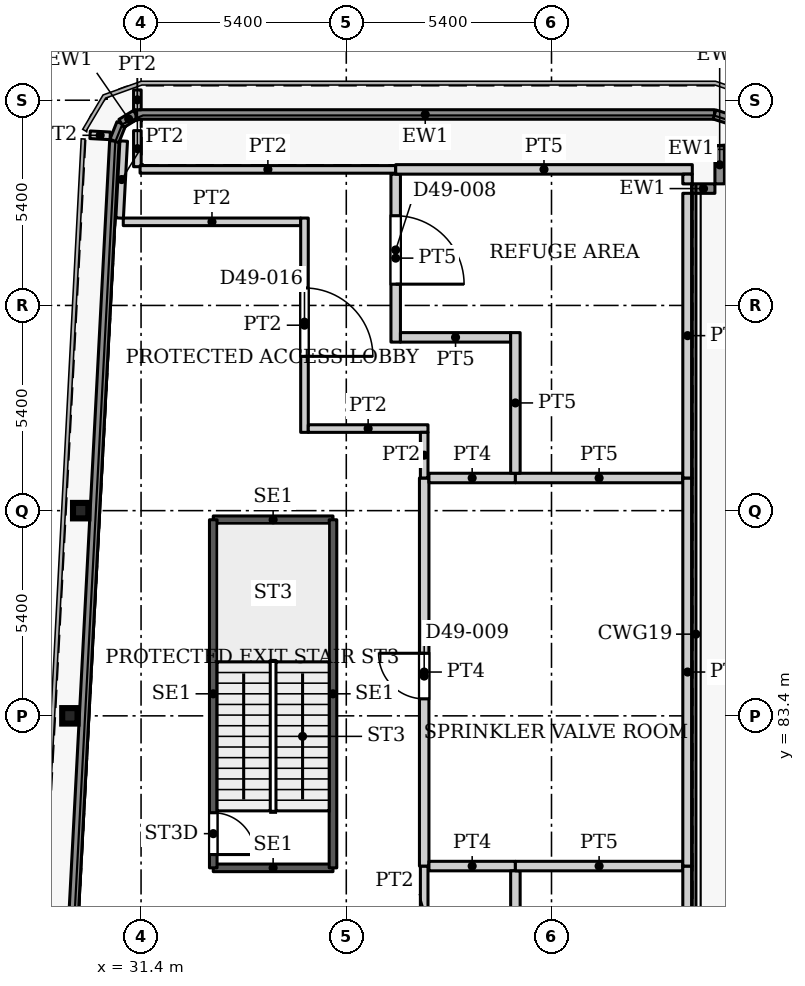
"""IFC4 building model, lengths in metres.
Left out: names, types, materials, properties, quantities, classifications, styles, units other than length and angle.
Written with IfcOpenShell. Run it as: python <this file> out.ifc"""

import sys

from ifc_helpers import new_model, si_unit, direction, frame, frame_2d, origin, origin_2d, place, context, subcontext, project, spatial, rectangle, i_section, extrude, source, transform, mapped, element, fill, save


model = new_model("IFC4")
c1 = context("Model", 3, precision=1e-05, world=origin(), true_north=direction((0.0, 1.0)))
c2 = subcontext(c1, "Body", "Model", "MODEL_VIEW")
j1 = project(units=[si_unit("LENGTHUNIT", "METRE"), si_unit("PLANEANGLEUNIT", "RADIAN")], contexts=[c1])
p1 = place(None, origin())
s1 = spatial("IfcSite", under=j1, at=p1, CompositionType="ELEMENT")
p2 = place(p1, origin())
s2 = spatial("IfcBuilding", under=s1, at=p2, CompositionType="ELEMENT")
p3 = place(p2, frame((0.0, 0.0, 211.1)))
s3 = spatial("IfcBuildingStorey", under=s2, at=p3, CompositionType="ELEMENT", Elevation=211.1)
for number, where, z_axis, x_axis in (
    (1, (29.527, 83.4, 0.0), (0.0, 0.0, 1.0), (1.0, 0.0, 0.0)),
    (2, (29.811, 88.8, 0.0), (0.0, 0.0, 1.0), (1.0, 0.0, 0.0)),
):
    element("IfcColumn", number, at=place(p3, frame(where, z_axis=z_axis, x_axis=x_axis)), inside=s3, PredefinedType="COLUMN", context=c2, shape_type="SweptSolid", body=[
        extrude(i_section(OverallWidth=0.404, OverallDepth=0.407, WebThickness=0.027, FlangeThickness=0.044, FilletRadius=0.012, at=origin_2d()), origin(), (0.0, 0.0, 1.0), 5.1),
    ])
p4 = place(p3, frame((27.195, 31.969, 0.0), z_axis=(0.0, 0.0, 1.0), x_axis=(0.052556141556, 0.99861797099, 0.0)))
e3 = element("IfcWall", 3, at=p4, inside=s3, PredefinedType="SOLIDWALL", context=c2, shape_type="SweptSolid", body=[
    extrude(rectangle(XDim=66.651, YDim=0.25, at=frame_2d((33.326, 0.0))), origin(), (0.0, 0.0, 1.0), 4.95),
])
p5 = place(p3, frame((30.698, 98.528, 0.0), z_axis=(0.0, 0.0, 1.0), x_axis=(0.370881773365, 0.928680090336, 0.0)))
e4 = element("IfcWall", 4, at=p5, inside=s3, PredefinedType="SOLIDWALL", context=c2, shape_type="SweptSolid", body=[
    extrude(rectangle(XDim=0.496, YDim=0.25, at=frame_2d((0.248, 0.0))), origin(), (0.0, 0.0, 1.0), 4.95),
])
p6 = place(p3, frame((30.882, 98.989, 0.0), z_axis=(0.0, 0.0, 1.0), x_axis=(0.851899959866, 0.523704552568, 0.0)))
e5 = element("IfcWall", 5, at=p6, inside=s3, PredefinedType="SOLIDWALL", context=c2, shape_type="SweptSolid", body=[
    extrude(rectangle(XDim=0.451, YDim=0.25, at=frame_2d((0.225, 0.0))), origin(), (0.0, 0.0, 1.0), 4.95),
])
p7 = place(p3, frame((31.266, 99.225, 0.0), z_axis=(0.0, 0.0, 1.0), x_axis=(1.0, 0.0, 0.0)))
e6 = element("IfcWall", 6, at=p7, inside=s3, PredefinedType="SOLIDWALL", context=c2, shape_type="SweptSolid", body=[
    extrude(rectangle(XDim=15.223, YDim=0.25, at=frame_2d((7.611, 0.0))), origin(), (0.0, 0.0, 1.0), 4.95),
])
p8 = place(p3, frame((46.489, 99.225, 0.0), z_axis=(0.0, 0.0, 1.0), x_axis=(0.952979365451, -0.303035194367, 0.0)))
e7 = element("IfcWall", 7, at=p8, inside=s3, PredefinedType="SOLIDWALL", context=c2, shape_type="SweptSolid", body=[
    extrude(rectangle(XDim=0.479, YDim=0.25, at=frame_2d((0.239, 0.0))), origin(), (0.0, 0.0, 1.0), 4.95),
])
p9 = place(p3, frame((47.441, 98.337, 0.0), z_axis=(0.0, 0.0, 1.0), x_axis=(-0.997866442629, -0.065288304281, 0.0)))
e8 = element("IfcWall", 8, at=p9, inside=s3, PredefinedType="SOLIDWALL", context=c2, shape_type="SweptSolid", body=[
    extrude(rectangle(XDim=0.935, YDim=0.25, at=frame_2d((0.467, 0.0))), origin(), (0.0, 0.0, 1.0), 4.95),
])
p10 = place(p3, frame((46.625, 98.401, 0.0), z_axis=(0.0, 0.0, 1.0), x_axis=(0.0, -1.0, 0.0)))
e9 = element("IfcWall", 9, at=p10, inside=s3, PredefinedType="SOLIDWALL", context=c2, shape_type="SweptSolid", body=[
    extrude(rectangle(XDim=1.001, YDim=0.25, at=frame_2d((0.5, 0.0))), origin(), (0.0, 0.0, 1.0), 4.95),
])
p11 = place(p3, frame((46.5, 97.275, 0.0), z_axis=(0.0, 0.0, 1.0), x_axis=(-1.0, 0.0, 0.0)))
e10 = element("IfcWall", 10, at=p11, inside=s3, PredefinedType="SOLIDWALL", context=c2, shape_type="SweptSolid", body=[
    extrude(rectangle(XDim=0.6, YDim=0.25, at=frame_2d((0.3, 0.0))), origin(), (0.0, 0.0, 1.0), 4.95),
])
for number, where, z_axis, x_axis in (
    (11, (33.3, 79.4, 0.0), (0.0, 0.0, 1.0), (1.0, 0.0, 0.0)),
    (12, (33.3, 88.56, 0.0), (0.0, 0.0, 1.0), (1.0, 0.0, 0.0)),
):
    element("IfcWall", number, at=place(p3, frame(where, z_axis=z_axis, x_axis=x_axis)), inside=s3, PredefinedType="SHEAR", context=c2, shape_type="SweptSolid", body=[
        extrude(rectangle(XDim=3.15, YDim=0.2, at=frame_2d((1.575, 0.0))), origin(), (0.0, 0.0, 1.0), 5.1),
    ])
p12 = place(p3, frame((33.3, 79.4, 0.0), z_axis=(0.0, 0.0, 1.0), x_axis=(0.0, 1.0, 0.0)))
e13 = element("IfcWall", 13, at=p12, inside=s3, PredefinedType="SHEAR", context=c2, shape_type="SweptSolid", body=[
    extrude(rectangle(XDim=9.16, YDim=0.2, at=frame_2d((4.58, 0.0))), origin(), (0.0, 0.0, 1.0), 5.1),
])
p13 = place(p12, frame((0.35, 0.0, 0.0)))
e14 = element("IfcOpeningElement", 14, at=p13, cuts=e13, PredefinedType="OPENING", context=c2, shape_type="SweptSolid", body=[
    extrude(rectangle(XDim=1.1, YDim=2.2, at=frame_2d((0.55, 1.1))), frame((0.0, 0.11, 0.0), z_axis=(0.0, -1.0, 0.0), x_axis=(1.0, 0.0, 0.0)), (0.0, 0.0, 1.0), 0.22),
])
p14 = place(p3, frame((36.45, 79.4, 0.0), z_axis=(0.0, 0.0, 1.0), x_axis=(0.0, 1.0, 0.0)))
e15 = element("IfcWall", 15, at=p14, inside=s3, PredefinedType="SHEAR", context=c2, shape_type="SweptSolid", body=[
    extrude(rectangle(XDim=9.16, YDim=0.2, at=frame_2d((4.58, 0.0))), origin(), (0.0, 0.0, 1.0), 5.1),
])
p15 = place(p3, frame((30.059, 98.691, 0.0), z_axis=(0.0, 0.0, 1.0), x_axis=(0.998617829333, -0.052558833123, 0.0)))
e16 = element("IfcWall", 16, at=p15, inside=s3, PredefinedType="PARTITIONING", context=c2, shape_type="SweptSolid", body=[
    extrude(rectangle(XDim=0.53, YDim=0.2, at=frame_2d((0.265, 0.0))), origin(), (0.0, 0.0, 1.0), 4.8),
])
p16 = place(p3, frame((30.836, 96.5, 0.0), z_axis=(0.0, 0.0, 1.0), x_axis=(0.052830433288, 0.99860349755, 0.0)))
e17 = element("IfcWall", 17, at=p16, inside=s3, PredefinedType="PARTITIONING", context=c2, shape_type="SweptSolid", body=[
    extrude(rectangle(XDim=2.029, YDim=0.2, at=frame_2d((1.014, 0.0))), origin(), (0.0, 0.0, 1.0), 4.8),
])
p17 = place(p3, frame((30.932, 96.4, 0.0), z_axis=(0.0, 0.0, 1.0), x_axis=(1.0, 0.0, 0.0)))
e18 = element("IfcWall", 18, at=p17, inside=s3, PredefinedType="PARTITIONING", context=c2, shape_type="SweptSolid", body=[
    extrude(rectangle(XDim=4.668, YDim=0.2, at=frame_2d((2.334, 0.0))), origin(), (0.0, 0.0, 1.0), 4.8),
])
p18 = place(p3, frame((31.303, 97.851, 0.0), z_axis=(0.0, 0.0, 1.0), x_axis=(0.0, 1.0, 0.0)))
e19 = element("IfcWall", 19, at=p18, inside=s3, PredefinedType="PARTITIONING", context=c2, shape_type="SweptSolid", body=[
    extrude(rectangle(XDim=0.949, YDim=0.2, at=frame_2d((0.475, 0.0))), origin(), (0.0, 0.0, 1.0), 4.8),
])
p19 = place(p3, frame((31.303, 99.349, 0.0), z_axis=(0.0, 0.0, 1.0), x_axis=(0.0, 1.0, 0.0)))
e20 = element("IfcWall", 20, at=p19, inside=s3, PredefinedType="PARTITIONING", context=c2, shape_type="SweptSolid", body=[
    extrude(rectangle(XDim=0.522, YDim=0.2, at=frame_2d((0.261, 0.0))), origin(), (0.0, 0.0, 1.0), 4.8),
])
p20 = place(p3, frame((31.374, 97.78, 0.0), z_axis=(0.0, 0.0, 1.0), x_axis=(1.0, 0.0, 0.0)))
e21 = element("IfcWall", 21, at=p20, inside=s3, PredefinedType="PARTITIONING", context=c2, shape_type="SweptSolid", body=[
    extrude(rectangle(XDim=6.726, YDim=0.2, at=frame_2d((3.363, 0.0))), origin(), (0.0, 0.0, 1.0), 4.8),
])
p21 = place(p3, frame((35.7, 90.86, 0.0), z_axis=(0.0, 0.0, 1.0), x_axis=(0.0, 1.0, 0.0)))
e22 = element("IfcWall", 22, at=p21, inside=s3, PredefinedType="PARTITIONING", context=c2, shape_type="SweptSolid", body=[
    extrude(rectangle(XDim=5.64, YDim=0.2, at=frame_2d((2.82, 0.0))), origin(), (0.0, 0.0, 1.0), 4.8),
])
p22 = place(p21, frame((2.0, 0.0, 0.0)))
e23 = element("IfcOpeningElement", 23, at=p22, cuts=e22, PredefinedType="OPENING", context=c2, shape_type="SweptSolid", body=[
    extrude(rectangle(XDim=1.8, YDim=2.1, at=frame_2d((0.9, 1.05))), frame((0.0, 0.11, 0.0), z_axis=(0.0, -1.0, 0.0), x_axis=(1.0, 0.0, 0.0)), (0.0, 0.0, 1.0), 0.22),
])
p23 = place(p3, frame((35.8, 90.96, 0.0), z_axis=(0.0, 0.0, 1.0), x_axis=(1.0, 0.0, 0.0)))
e24 = element("IfcWall", 24, at=p23, inside=s3, PredefinedType="PARTITIONING", context=c2, shape_type="SweptSolid", body=[
    extrude(rectangle(XDim=3.15, YDim=0.2, at=frame_2d((1.575, 0.0))), origin(), (0.0, 0.0, 1.0), 4.8),
])
p24 = place(p3, frame((38.1, 93.235, 0.0), z_axis=(0.0, 0.0, 1.0), x_axis=(0.0, 1.0, 0.0)))
e25 = element("IfcWall", 25, at=p24, inside=s3, PredefinedType="PARTITIONING", context=c2, shape_type="SweptSolid", body=[
    extrude(rectangle(XDim=4.42, YDim=0.25, at=frame_2d((2.21, 0.0))), origin(), (0.0, 0.0, 1.0), 4.8),
])
p25 = place(p24, frame((1.525, 0.0, 0.0)))
e26 = element("IfcOpeningElement", 26, at=p25, cuts=e25, PredefinedType="OPENING", context=c2, shape_type="SweptSolid", body=[
    extrude(rectangle(XDim=1.8, YDim=2.1, at=frame_2d((0.9, 1.05))), frame((0.0, 0.135, 0.0), z_axis=(0.0, -1.0, 0.0), x_axis=(1.0, 0.0, 0.0)), (0.0, 0.0, 1.0), 0.27),
])
p26 = place(p3, frame((38.1, 97.78, 0.0), z_axis=(0.0, 0.0, 1.0), x_axis=(1.0, 0.0, 0.0)))
e27 = element("IfcWall", 27, at=p26, inside=s3, PredefinedType="PARTITIONING", context=c2, shape_type="SweptSolid", body=[
    extrude(rectangle(XDim=7.805, YDim=0.25, at=frame_2d((3.902, 0.0))), origin(), (0.0, 0.0, 1.0), 4.8),
])
p27 = place(p3, frame((38.225, 93.36, 0.0), z_axis=(0.0, 0.0, 1.0), x_axis=(1.0, 0.0, 0.0)))
e28 = element("IfcWall", 28, at=p27, inside=s3, PredefinedType="PARTITIONING", context=c2, shape_type="SweptSolid", body=[
    extrude(rectangle(XDim=2.9, YDim=0.25, at=frame_2d((1.45, 0.0))), origin(), (0.0, 0.0, 1.0), 4.8),
])
p28 = place(p3, frame((38.85, 77.1, 0.0), z_axis=(0.0, 0.0, 1.0), x_axis=(0.0, 1.0, 0.0)))
e29 = element("IfcWall", 29, at=p28, inside=s3, PredefinedType="PARTITIONING", context=c2, shape_type="SweptSolid", body=[
    extrude(rectangle(XDim=2.347, YDim=0.2, at=frame_2d((1.173, 0.0))), origin(), (0.0, 0.0, 1.0), 4.8),
])
p29 = place(p3, frame((38.85, 79.447, 0.0), z_axis=(0.0, 0.0, 1.0), x_axis=(0.0, 1.0, 0.0)))
e30 = element("IfcWall", 30, at=p29, inside=s3, PredefinedType="PARTITIONING", context=c2, shape_type="SweptSolid", body=[
    extrude(rectangle(XDim=10.212, YDim=0.25, at=frame_2d((5.106, 0.0))), origin(), (0.0, 0.0, 1.0), 4.8),
])
p30 = place(p29, frame((4.4, 0.0, 0.0)))
e31 = element("IfcOpeningElement", 31, at=p30, cuts=e30, PredefinedType="OPENING", context=c2, shape_type="SweptSolid", body=[
    extrude(rectangle(XDim=1.2, YDim=2.1, at=frame_2d((0.6, 1.05))), frame((0.0, 0.135, 0.0), z_axis=(0.0, -1.0, 0.0), x_axis=(1.0, 0.0, 0.0)), (0.0, 0.0, 1.0), 0.27),
])
p31 = place(p3, frame((38.85, 89.659, 0.0), z_axis=(0.0, 0.0, 1.0), x_axis=(0.0, 1.0, 0.0)))
e32 = element("IfcWall", 32, at=p31, inside=s3, PredefinedType="PARTITIONING", context=c2, shape_type="SweptSolid", body=[
    extrude(rectangle(XDim=1.201, YDim=0.2, at=frame_2d((0.601, 0.0))), origin(), (0.0, 0.0, 1.0), 4.8),
])
for number, where, z_axis, x_axis in (
    (33, (38.975, 79.447, 0.0), (0.0, 0.0, 1.0), (1.0, 0.0, 0.0)),
    (34, (38.975, 89.659, 0.0), (0.0, 0.0, 1.0), (1.0, 0.0, 0.0)),
):
    element("IfcWall", number, at=place(p3, frame(where, z_axis=z_axis, x_axis=x_axis)), inside=s3, PredefinedType="PARTITIONING", context=c2, shape_type="SweptSolid", body=[
        extrude(rectangle(XDim=2.275, YDim=0.25, at=frame_2d((1.137, 0.0))), origin(), (0.0, 0.0, 1.0), 4.8),
    ])
p32 = place(p3, frame((41.25, 74.475, 0.0), z_axis=(0.0, 0.0, 1.0), x_axis=(0.0, 1.0, 0.0)))
e35 = element("IfcWall", 35, at=p32, inside=s3, PredefinedType="PARTITIONING", context=c2, shape_type="SweptSolid", body=[
    extrude(rectangle(XDim=4.847, YDim=0.25, at=frame_2d((2.423, 0.0))), origin(), (0.0, 0.0, 1.0), 4.8),
])
for number, where, z_axis, x_axis in (
    (36, (41.25, 79.447, 0.0), (0.0, 0.0, 1.0), (1.0, 0.0, 0.0)),
    (37, (41.25, 89.659, 0.0), (0.0, 0.0, 1.0), (1.0, 0.0, 0.0)),
):
    element("IfcWall", number, at=place(p3, frame(where, z_axis=z_axis, x_axis=x_axis)), inside=s3, PredefinedType="PARTITIONING", context=c2, shape_type="SweptSolid", body=[
        extrude(rectangle(XDim=4.405, YDim=0.25, at=frame_2d((2.203, 0.0))), origin(), (0.0, 0.0, 1.0), 4.8),
    ])
p33 = place(p3, frame((41.25, 89.784, 0.0), z_axis=(0.0, 0.0, 1.0), x_axis=(0.0, 1.0, 0.0)))
e38 = element("IfcWall", 38, at=p33, inside=s3, PredefinedType="PARTITIONING", context=c2, shape_type="SweptSolid", body=[
    extrude(rectangle(XDim=3.701, YDim=0.25, at=frame_2d((1.851, 0.0))), origin(), (0.0, 0.0, 1.0), 4.8),
])
p34 = place(p3, frame((45.78, 73.699, 0.0), z_axis=(0.0, 0.0, 1.0), x_axis=(0.0, 1.0, 0.0)))
e39 = element("IfcWall", 39, at=p34, inside=s3, PredefinedType="PARTITIONING", context=c2, shape_type="SweptSolid", body=[
    extrude(rectangle(XDim=5.748, YDim=0.25, at=frame_2d((2.874, 0.0))), origin(), (0.0, 0.0, 1.0), 4.8),
])
p35 = place(p3, frame((45.78, 79.447, 0.0), z_axis=(0.0, 0.0, 1.0), x_axis=(0.0, 1.0, 0.0)))
e40 = element("IfcWall", 40, at=p35, inside=s3, PredefinedType="PARTITIONING", context=c2, shape_type="SweptSolid", body=[
    extrude(rectangle(XDim=10.212, YDim=0.25, at=frame_2d((5.106, 0.0))), origin(), (0.0, 0.0, 1.0), 4.8),
])
p36 = place(p3, frame((45.78, 89.659, 0.0), z_axis=(0.0, 0.0, 1.0), x_axis=(0.0, 1.0, 0.0)))
e41 = element("IfcWall", 41, at=p36, inside=s3, PredefinedType="PARTITIONING", context=c2, shape_type="SweptSolid", body=[
    extrude(rectangle(XDim=7.492, YDim=0.25, at=frame_2d((3.746, 0.0))), origin(), (0.0, 0.0, 1.0), 4.8),
])
p37 = place(p3, frame((45.78, 97.399, 0.0), z_axis=(0.0, 0.0, 1.0), x_axis=(0.0, 1.0, 0.0)))
e42 = element("IfcWall", 42, at=p37, inside=s3, PredefinedType="PARTITIONING", context=c2, shape_type="SweptSolid", body=[
    extrude(rectangle(XDim=0.256, YDim=0.25, at=frame_2d((0.128, 0.0))), origin(), (0.0, 0.0, 1.0), 4.8),
])
m1 = source(origin(), c2, "Body", "SweptSolid", [
    extrude(rectangle(XDim=1.1, YDim=2.2, at=frame_2d((0.55, 1.1))), frame((0.0, 0.025, 0.0), z_axis=(0.0, -1.0, 0.0), x_axis=(1.0, 0.0, 0.0)), (0.0, 0.0, 1.0), 0.05),
])
p38 = place(p13, origin())
e43 = element("IfcDoor", 43, at=p38, inside=s3, OperationType="SINGLE_SWING_RIGHT", PredefinedType="DOOR", context=c2, shape_type="MappedRepresentation", body=[
    mapped(m1, transform((0.0, 0.0, 0.0), x_axis=(1.0, 0.0, 0.0), y_axis=(0.0, 1.0, 0.0), z_axis=(0.0, 0.0, 1.0), scale=1.0)),
])
fill(e14, e43)
m2 = source(origin(), c2, "Body", "SweptSolid", [
    extrude(rectangle(XDim=1.8, YDim=2.1, at=frame_2d((0.9, 1.05))), frame((0.0, 0.025, 0.0), z_axis=(0.0, -1.0, 0.0), x_axis=(1.0, 0.0, 0.0)), (0.0, 0.0, 1.0), 0.05),
])
p39 = place(p25, origin())
e44 = element("IfcDoor", 44, at=p39, inside=s3, OperationType="DOUBLE_DOOR_SINGLE_SWING", PredefinedType="DOOR", context=c2, shape_type="MappedRepresentation", body=[
    mapped(m2, transform((0.0, 0.0, 0.0), x_axis=(1.0, 0.0, 0.0), y_axis=(0.0, 1.0, 0.0), z_axis=(0.0, 0.0, 1.0), scale=1.0)),
])
fill(e26, e44)
m3 = source(origin(), c2, "Body", "SweptSolid", [
    extrude(rectangle(XDim=1.2, YDim=2.1, at=frame_2d((0.6, 1.05))), frame((0.0, 0.025, 0.0), z_axis=(0.0, -1.0, 0.0), x_axis=(1.0, 0.0, 0.0)), (0.0, 0.0, 1.0), 0.05),
])
p40 = place(p30, origin())
e45 = element("IfcDoor", 45, at=p40, inside=s3, OperationType="SINGLE_SWING_LEFT", PredefinedType="DOOR", context=c2, shape_type="MappedRepresentation", body=[
    mapped(m3, transform((0.0, 0.0, 0.0), x_axis=(1.0, 0.0, 0.0), y_axis=(0.0, 1.0, 0.0), z_axis=(0.0, 0.0, 1.0), scale=1.0)),
])
fill(e31, e45)
m4 = source(origin(), c2, "Body", "SweptSolid", [
    extrude(rectangle(XDim=1.8, YDim=2.1, at=frame_2d((0.9, 1.05))), frame((0.0, 0.025, 0.0), z_axis=(0.0, -1.0, 0.0), x_axis=(1.0, 0.0, 0.0)), (0.0, 0.0, 1.0), 0.05),
])
p41 = place(p22, origin())
e46 = element("IfcDoor", 46, at=p41, inside=s3, OperationType="DOUBLE_DOOR_SINGLE_SWING", PredefinedType="DOOR", context=c2, shape_type="MappedRepresentation", body=[
    mapped(m4, transform((0.0, 0.0, 0.0), x_axis=(1.0, 0.0, 0.0), y_axis=(0.0, 1.0, 0.0), z_axis=(0.0, 0.0, 1.0), scale=1.0)),
])
fill(e23, e46)
save(model, sys.argv[1])
